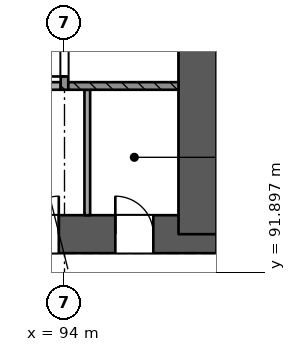
"""IFC4 building model, lengths in metres.
Left out: names, types, materials, properties, quantities, classifications, styles, units other than length and angle.
Written with IfcOpenShell. Run it as: python <this file> out.ifc"""

import sys

from ifc_helpers import new_model, si_unit, direction, frame, frame_2d, origin, place, context, subcontext, project, spatial, rectangle, extrude, element, fill, save


model = new_model("IFC4")
c1 = context("Model", 3, precision=1e-05, world=origin(), true_north=direction((0.0, 1.0)))
c2 = subcontext(c1, "Body", "Model", "MODEL_VIEW")
j1 = project(units=[si_unit("LENGTHUNIT", "METRE"), si_unit("PLANEANGLEUNIT", "RADIAN")], contexts=[c1])
p1 = place(None, origin())
s1 = spatial("IfcSite", under=j1, at=p1, CompositionType="ELEMENT")
p2 = place(p1, origin())
s2 = spatial("IfcBuilding", under=s1, at=p2, CompositionType="ELEMENT")
p3 = place(p2, frame((0.0, 0.0, 18.0)))
s3 = spatial("IfcBuildingStorey", under=s2, at=p3, CompositionType="ELEMENT", Elevation=18.0)
p4 = place(p3, frame((72.5, 92.9, 0.0), z_axis=(0.0, 0.0, 1.0), x_axis=(1.0, 0.0, 0.0)))
e1 = element("IfcWall", 1, at=p4, inside=s3, PredefinedType="SHEAR", context=c2, shape_type="SweptSolid", body=[
    extrude(rectangle(XDim=25.5, YDim=1.0, at=frame_2d((12.75, 0.0))), origin(), (0.0, 0.0, 1.0), 4.5),
])
p5 = place(p4, frame((1.3, 0.0, 0.0)))
e2 = element("IfcOpeningElement", 2, at=p5, cuts=e1, PredefinedType="OPENING", context=c2, shape_type="SweptSolid", body=[
    extrude(rectangle(XDim=1.2, YDim=2.1, at=frame_2d((0.6, 1.05))), frame((0.0, 0.51, 0.0), z_axis=(0.0, -1.0, 0.0), x_axis=(1.0, 0.0, 0.0)), (0.0, 0.0, 1.0), 1.021),
])
p6 = place(p4, frame((3.5, 0.0, 0.0)))
e3 = element("IfcOpeningElement", 3, at=p6, cuts=e1, PredefinedType="OPENING", context=c2, shape_type="SweptSolid", body=[
    extrude(rectangle(XDim=1.2, YDim=2.1, at=frame_2d((0.6, 1.05))), frame((0.0, 0.51, 0.0), z_axis=(0.0, -1.0, 0.0), x_axis=(1.0, 0.0, 0.0)), (0.0, 0.0, 1.0), 1.021),
])
p7 = place(p4, frame((13.5, 0.0, 0.0)))
e4 = element("IfcOpeningElement", 4, at=p7, cuts=e1, PredefinedType="OPENING", context=c2, shape_type="SweptSolid", body=[
    extrude(rectangle(XDim=1.2, YDim=2.1, at=frame_2d((0.6, 1.05))), frame((0.0, 0.51, 0.0), z_axis=(0.0, -1.0, 0.0), x_axis=(1.0, 0.0, 0.0)), (0.0, 0.0, 1.0), 1.021),
])
p8 = place(p4, frame((15.562, 0.0, 0.0)))
e5 = element("IfcOpeningElement", 5, at=p8, cuts=e1, PredefinedType="OPENING", context=c2, shape_type="SweptSolid", body=[
    extrude(rectangle(XDim=1.0, YDim=2.1, at=frame_2d((0.5, 1.05))), frame((0.0, 0.51, 0.0), z_axis=(0.0, -1.0, 0.0), x_axis=(1.0, 0.0, 0.0)), (0.0, 0.0, 1.0), 1.021),
])
p9 = place(p4, frame((17.8, 0.0, 0.0)))
e6 = element("IfcOpeningElement", 6, at=p9, cuts=e1, PredefinedType="OPENING", context=c2, shape_type="SweptSolid", body=[
    extrude(rectangle(XDim=1.0, YDim=2.1, at=frame_2d((0.5, 1.05))), frame((0.0, 0.51, 0.0), z_axis=(0.0, -1.0, 0.0), x_axis=(1.0, 0.0, 0.0)), (0.0, 0.0, 1.0), 1.021),
])
p10 = place(p4, frame((20.35, 0.0, 0.0)))
e7 = element("IfcOpeningElement", 7, at=p10, cuts=e1, PredefinedType="OPENING", context=c2, shape_type="SweptSolid", body=[
    extrude(rectangle(XDim=1.0, YDim=2.1, at=frame_2d((0.5, 1.05))), frame((0.0, 0.51, 0.0), z_axis=(0.0, -1.0, 0.0), x_axis=(1.0, 0.0, 0.0)), (0.0, 0.0, 1.0), 1.021),
])
p11 = place(p4, frame((22.837, 0.0, 0.0)))
e8 = element("IfcOpeningElement", 8, at=p11, cuts=e1, PredefinedType="OPENING", context=c2, shape_type="SweptSolid", body=[
    extrude(rectangle(XDim=1.0, YDim=2.1, at=frame_2d((0.5, 1.05))), frame((0.0, 0.51, 0.0), z_axis=(0.0, -1.0, 0.0), x_axis=(1.0, 0.0, 0.0)), (0.0, 0.0, 1.0), 1.021),
])
p12 = place(p3, frame((97.5, 92.9, 0.0), z_axis=(0.0, 0.0, 1.0), x_axis=(0.0, 1.0, 0.0)))
e9 = element("IfcWall", 9, at=p12, inside=s3, PredefinedType="SHEAR", context=c2, shape_type="SweptSolid", body=[
    extrude(rectangle(XDim=11.5, YDim=1.0, at=frame_2d((5.75, 0.0))), origin(), (0.0, 0.0, 1.0), 4.5),
])
p13 = place(p3, frame((86.747, 47.526, 0.0), z_axis=(0.0, 0.0, 1.0), x_axis=(0.500000085768, 0.866025354266, 0.0)))
e10 = element("IfcWall", 10, at=p13, inside=s3, PredefinedType="PARTITIONING", context=c2, shape_type="SweptSolid", body=[
    extrude(rectangle(XDim=55.365, YDim=0.15, at=frame_2d((27.682, 0.0))), origin(), (0.0, 0.0, 1.0), 3.55),
])
p14 = place(p13, frame((0.97, 0.0, 0.0)))
e11 = element("IfcOpeningElement", 11, at=p14, cuts=e10, PredefinedType="OPENING", context=c2, shape_type="SweptSolid", body=[
    extrude(rectangle(XDim=1.2, YDim=2.1, at=frame_2d((0.6, 1.05))), frame((0.0, 0.085, 0.0), z_axis=(0.0, -1.0, 0.0), x_axis=(1.0, 0.0, 0.0)), (0.0, 0.0, 1.0), 0.171),
])
p15 = place(p13, frame((11.332, 0.0, 0.0)))
e12 = element("IfcOpeningElement", 12, at=p15, cuts=e10, PredefinedType="OPENING", context=c2, shape_type="SweptSolid", body=[
    extrude(rectangle(XDim=1.2, YDim=2.1, at=frame_2d((0.6, 1.05))), frame((0.0, 0.085, 0.0), z_axis=(0.0, -1.0, 0.0), x_axis=(1.0, 0.0, 0.0)), (0.0, 0.0, 1.0), 0.171),
])
p16 = place(p13, frame((22.582, 0.0, 0.0)))
e13 = element("IfcOpeningElement", 13, at=p16, cuts=e10, PredefinedType="OPENING", context=c2, shape_type="SweptSolid", body=[
    extrude(rectangle(XDim=1.2, YDim=2.1, at=frame_2d((0.6, 1.05))), frame((0.0, 0.085, 0.0), z_axis=(0.0, -1.0, 0.0), x_axis=(1.0, 0.0, 0.0)), (0.0, 0.0, 1.0), 0.171),
])
p17 = place(p13, frame((28.365, 0.0, 0.0)))
e14 = element("IfcOpeningElement", 14, at=p17, cuts=e10, PredefinedType="OPENING", context=c2, shape_type="SweptSolid", body=[
    extrude(rectangle(XDim=1.0, YDim=2.1, at=frame_2d((0.5, 1.05))), frame((0.0, 0.085, 0.0), z_axis=(0.0, -1.0, 0.0), x_axis=(1.0, 0.0, 0.0)), (0.0, 0.0, 1.0), 0.171),
])
p18 = place(p13, frame((30.615, 0.0, 0.0)))
e15 = element("IfcOpeningElement", 15, at=p18, cuts=e10, PredefinedType="OPENING", context=c2, shape_type="SweptSolid", body=[
    extrude(rectangle(XDim=1.0, YDim=2.1, at=frame_2d((0.5, 1.05))), frame((0.0, 0.085, 0.0), z_axis=(0.0, -1.0, 0.0), x_axis=(1.0, 0.0, 0.0)), (0.0, 0.0, 1.0), 0.171),
])
p19 = place(p13, frame((38.332, 0.0, 0.0)))
e16 = element("IfcOpeningElement", 16, at=p19, cuts=e10, PredefinedType="OPENING", context=c2, shape_type="SweptSolid", body=[
    extrude(rectangle(XDim=1.2, YDim=2.1, at=frame_2d((0.6, 1.05))), frame((0.0, 0.085, 0.0), z_axis=(0.0, -1.0, 0.0), x_axis=(1.0, 0.0, 0.0)), (0.0, 0.0, 1.0), 0.171),
])
p20 = place(p13, frame((49.582, 0.0, 0.0)))
e17 = element("IfcOpeningElement", 17, at=p20, cuts=e10, PredefinedType="OPENING", context=c2, shape_type="SweptSolid", body=[
    extrude(rectangle(XDim=1.2, YDim=2.1, at=frame_2d((0.6, 1.05))), frame((0.0, 0.085, 0.0), z_axis=(0.0, -1.0, 0.0), x_axis=(1.0, 0.0, 0.0)), (0.0, 0.0, 1.0), 0.171),
])
p21 = place(p3, frame((121.762, 95.574, 0.0), z_axis=(0.0, 0.0, 1.0), x_axis=(-0.499997306052, -0.866026959131, 0.0)))
e18 = element("IfcWall", 18, at=p21, inside=s3, PredefinedType="SOLIDWALL", context=c2, shape_type="SweptSolid", body=[
    extrude(rectangle(XDim=62.87, YDim=0.4, at=frame_2d((31.435, 0.0))), origin(), (0.0, 0.0, 1.0), 3.55),
])
p22 = place(p21, frame((59.452, 0.0, 0.9)))
e19 = element("IfcOpeningElement", 19, at=p22, cuts=e18, PredefinedType="OPENING", context=c2, shape_type="SweptSolid", body=[
    extrude(rectangle(XDim=2.4, YDim=1.5, at=frame_2d((1.2, 0.75))), frame((0.0, 0.21, 0.0), z_axis=(0.0, -1.0, 0.0), x_axis=(1.0, 0.0, 0.0)), (0.0, 0.0, 1.0), 0.421),
])
p23 = place(p21, frame((54.986, 0.0, 0.9)))
e20 = element("IfcOpeningElement", 20, at=p23, cuts=e18, PredefinedType="OPENING", context=c2, shape_type="SweptSolid", body=[
    extrude(rectangle(XDim=2.4, YDim=1.5, at=frame_2d((1.2, 0.75))), frame((0.0, 0.21, 0.0), z_axis=(0.0, -1.0, 0.0), x_axis=(1.0, 0.0, 0.0)), (0.0, 0.0, 1.0), 0.421),
])
p24 = place(p21, frame((50.486, 0.0, 0.9)))
e21 = element("IfcOpeningElement", 21, at=p24, cuts=e18, PredefinedType="OPENING", context=c2, shape_type="SweptSolid", body=[
    extrude(rectangle(XDim=2.4, YDim=1.5, at=frame_2d((1.2, 0.75))), frame((0.0, 0.21, 0.0), z_axis=(0.0, -1.0, 0.0), x_axis=(1.0, 0.0, 0.0)), (0.0, 0.0, 1.0), 0.421),
])
p25 = place(p21, frame((45.986, 0.0, 0.9)))
e22 = element("IfcOpeningElement", 22, at=p25, cuts=e18, PredefinedType="OPENING", context=c2, shape_type="SweptSolid", body=[
    extrude(rectangle(XDim=2.4, YDim=1.5, at=frame_2d((1.2, 0.75))), frame((0.0, 0.21, 0.0), z_axis=(0.0, -1.0, 0.0), x_axis=(1.0, 0.0, 0.0)), (0.0, 0.0, 1.0), 0.421),
])
p26 = place(p21, frame((41.486, 0.0, 0.9)))
e23 = element("IfcOpeningElement", 23, at=p26, cuts=e18, PredefinedType="OPENING", context=c2, shape_type="SweptSolid", body=[
    extrude(rectangle(XDim=2.4, YDim=1.5, at=frame_2d((1.2, 0.75))), frame((0.0, 0.21, 0.0), z_axis=(0.0, -1.0, 0.0), x_axis=(1.0, 0.0, 0.0)), (0.0, 0.0, 1.0), 0.421),
])
p27 = place(p21, frame((36.986, 0.0, 0.9)))
e24 = element("IfcOpeningElement", 24, at=p27, cuts=e18, PredefinedType="OPENING", context=c2, shape_type="SweptSolid", body=[
    extrude(rectangle(XDim=2.4, YDim=1.5, at=frame_2d((1.2, 0.75))), frame((0.0, 0.21, 0.0), z_axis=(0.0, -1.0, 0.0), x_axis=(1.0, 0.0, 0.0)), (0.0, 0.0, 1.0), 0.421),
])
p28 = place(p21, frame((23.486, 0.0, 0.9)))
e25 = element("IfcOpeningElement", 25, at=p28, cuts=e18, PredefinedType="OPENING", context=c2, shape_type="SweptSolid", body=[
    extrude(rectangle(XDim=2.4, YDim=1.5, at=frame_2d((1.2, 0.75))), frame((0.0, 0.21, 0.0), z_axis=(0.0, -1.0, 0.0), x_axis=(1.0, 0.0, 0.0)), (0.0, 0.0, 1.0), 0.421),
])
p29 = place(p21, frame((18.986, 0.0, 0.9)))
e26 = element("IfcOpeningElement", 26, at=p29, cuts=e18, PredefinedType="OPENING", context=c2, shape_type="SweptSolid", body=[
    extrude(rectangle(XDim=2.4, YDim=1.5, at=frame_2d((1.2, 0.75))), frame((0.0, 0.21, 0.0), z_axis=(0.0, -1.0, 0.0), x_axis=(1.0, 0.0, 0.0)), (0.0, 0.0, 1.0), 0.421),
])
p30 = place(p21, frame((14.486, 0.0, 0.9)))
e27 = element("IfcOpeningElement", 27, at=p30, cuts=e18, PredefinedType="OPENING", context=c2, shape_type="SweptSolid", body=[
    extrude(rectangle(XDim=2.4, YDim=1.5, at=frame_2d((1.2, 0.75))), frame((0.0, 0.21, 0.0), z_axis=(0.0, -1.0, 0.0), x_axis=(1.0, 0.0, 0.0)), (0.0, 0.0, 1.0), 0.421),
])
p31 = place(p21, frame((5.486, 0.0, 0.9)))
e28 = element("IfcOpeningElement", 28, at=p31, cuts=e18, PredefinedType="OPENING", context=c2, shape_type="SweptSolid", body=[
    extrude(rectangle(XDim=2.4, YDim=1.5, at=frame_2d((1.2, 0.75))), frame((0.0, 0.21, 0.0), z_axis=(0.0, -1.0, 0.0), x_axis=(1.0, 0.0, 0.0)), (0.0, 0.0, 1.0), 0.421),
])
p32 = place(p21, frame((1.018, 0.0, 0.9)))
e29 = element("IfcOpeningElement", 29, at=p32, cuts=e18, PredefinedType="OPENING", context=c2, shape_type="SweptSolid", body=[
    extrude(rectangle(XDim=2.4, YDim=1.5, at=frame_2d((1.2, 0.75))), frame((0.0, 0.21, 0.0), z_axis=(0.0, -1.0, 0.0), x_axis=(1.0, 0.0, 0.0)), (0.0, 0.0, 1.0), 0.421),
])
p33 = place(p3, frame((94.6, 93.4, 0.0), z_axis=(0.0, 0.0, 1.0), x_axis=(0.0, 1.0, 0.0)))
e30 = element("IfcWall", 30, at=p33, inside=s3, PredefinedType="PARTITIONING", context=c2, shape_type="SweptSolid", body=[
    extrude(rectangle(XDim=3.3, YDim=0.15, at=frame_2d((1.65, 0.0))), origin(), (0.0, 0.0, 1.0), 4.05),
])
p34 = place(p3, frame((91.5, 96.8, 0.0), z_axis=(0.0, 0.0, 1.0), x_axis=(1.0, 0.0, 0.0)))
e31 = element("IfcWall", 31, at=p34, inside=s3, PredefinedType="PARTITIONING", context=c2, shape_type="SweptSolid", body=[
    extrude(rectangle(XDim=2.4, YDim=0.2, at=frame_2d((1.2, 0.0))), origin(), (0.0, 0.0, 1.0), 4.05),
])
p35 = place(p3, frame((94.0, 96.7, 0.0), z_axis=(0.0, 0.0, 1.0), x_axis=(0.0, 1.0, 0.0)))
e32 = element("IfcWall", 32, at=p35, inside=s3, PredefinedType="SOLIDWALL", context=c2, shape_type="SweptSolid", body=[
    extrude(rectangle(XDim=3.7, YDim=0.2, at=frame_2d((1.85, 0.0))), origin(), (0.0, 0.0, 1.0), 4.05),
])
p36 = place(p35, frame((0.35, 0.0, 0.0)))
e33 = element("IfcOpeningElement", 33, at=p36, cuts=e32, PredefinedType="OPENING", context=c2, shape_type="SweptSolid", body=[
    extrude(rectangle(XDim=1.1, YDim=2.1, at=frame_2d((0.55, 1.05))), frame((0.0, 0.11, 0.0), z_axis=(0.0, -1.0, 0.0), x_axis=(1.0, 0.0, 0.0)), (0.0, 0.0, 1.0), 0.221),
])
p37 = place(p3, frame((94.1, 96.8, 0.0), z_axis=(0.0, 0.0, 1.0), x_axis=(1.0, 0.0, 0.0)))
e34 = element("IfcWall", 34, at=p37, inside=s3, PredefinedType="SOLIDWALL", context=c2, shape_type="SweptSolid", body=[
    extrude(rectangle(XDim=2.9, YDim=0.2, at=frame_2d((1.45, 0.0))), origin(), (0.0, 0.0, 1.0), 4.05),
])
p38 = place(p36, origin())
e35 = element("IfcDoor", 35, at=p38, inside=s3, OperationType="SINGLE_SWING_LEFT", PredefinedType="NOTDEFINED", context=c2, shape_type="SweptSolid", body=[
    extrude(rectangle(XDim=1.1, YDim=2.1, at=frame_2d((0.55, 1.05))), frame((0.0, 0.025, 0.0), z_axis=(0.0, -1.0, 0.0), x_axis=(1.0, 0.0, 0.0)), (0.0, 0.0, 1.0), 0.05),
])
fill(e33, e35)
p39 = place(p10, origin())
e36 = element("IfcDoor", 36, at=p39, inside=s3, OperationType="SINGLE_SWING_RIGHT", PredefinedType="NOTDEFINED", context=c2, shape_type="SweptSolid", body=[
    extrude(rectangle(XDim=1.0, YDim=2.1, at=frame_2d((0.5, 1.05))), frame((0.0, 0.025, 0.0), z_axis=(0.0, -1.0, 0.0), x_axis=(1.0, 0.0, 0.0)), (0.0, 0.0, 1.0), 0.05),
])
fill(e7, e36)
p40 = place(p11, origin())
e37 = element("IfcDoor", 37, at=p40, inside=s3, OperationType="SINGLE_SWING_LEFT", PredefinedType="NOTDEFINED", context=c2, shape_type="SweptSolid", body=[
    extrude(rectangle(XDim=1.0, YDim=2.1, at=frame_2d((0.5, 1.05))), frame((0.0, 0.025, 0.0), z_axis=(0.0, -1.0, 0.0), x_axis=(1.0, 0.0, 0.0)), (0.0, 0.0, 1.0), 0.05),
])
fill(e8, e37)
save(model, sys.argv[1])
